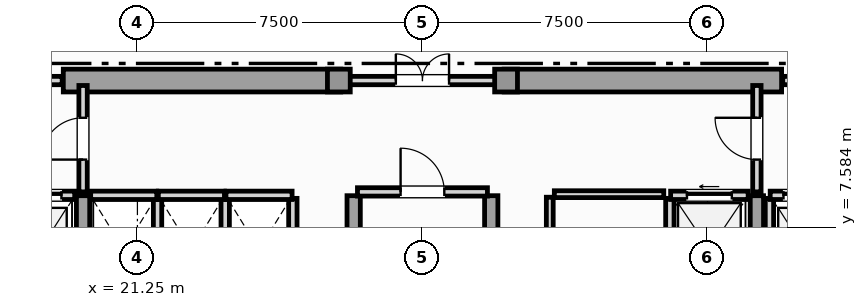
"""IFC4 building model, lengths in metres.
Left out: names, types, materials, properties, quantities, classifications, styles, units other than length and angle.
Written with IfcOpenShell. Run it as: python <this file> out.ifc"""

import sys

from ifc_helpers import new_model, si_unit, direction, frame, frame_2d, origin, origin_2d, place, context, subcontext, project, spatial, rectangle, extrude, element, fill, save


model = new_model("IFC4")
c1 = context("Model", 3, precision=1e-05, world=origin(), true_north=direction((0.0, 1.0)))
c2 = subcontext(c1, "Body", "Model", "MODEL_VIEW")
j1 = project(units=[si_unit("LENGTHUNIT", "METRE"), si_unit("PLANEANGLEUNIT", "RADIAN")], contexts=[c1])
p1 = place(None, origin())
s1 = spatial("IfcSite", under=j1, at=p1, CompositionType="ELEMENT")
p2 = place(p1, origin())
s2 = spatial("IfcBuilding", under=s1, at=p2, CompositionType="ELEMENT")
p3 = place(p2, frame((0.0, 0.0, 204.15)))
s3 = spatial("IfcBuildingStorey", under=s2, at=p3, CompositionType="ELEMENT", Elevation=204.15)
for number, where, z_axis, x_axis in (
    (1, (19.3, 11.45, 0.0), (0.0, 0.0, 1.0), (1.0, 0.0, 0.0)),
    (2, (30.9, 11.45, 0.0), (0.0, 0.0, 1.0), (1.0, 0.0, 0.0)),
):
    element("IfcWall", number, at=place(p3, frame(where, z_axis=z_axis, x_axis=x_axis)), inside=s3, PredefinedType="SHEAR", context=c2, shape_type="SweptSolid", body=[
        extrude(rectangle(XDim=7.3, YDim=0.6, at=frame_2d((3.65, 0.0))), origin(), (0.0, 0.0, 1.0), 3.63),
    ])
for number, where, z_axis, x_axis in (
    (3, (19.82, 0.92, 0.0), (0.0, 0.0, 1.0), (0.0, 1.0, 0.0)),
    (4, (26.94, 0.92, 0.0), (0.0, 0.0, 1.0), (0.0, 1.0, 0.0)),
    (5, (30.56, 0.92, 0.0), (0.0, 0.0, 1.0), (0.0, 1.0, 0.0)),
    (6, (37.55, 0.92, 0.0), (0.0, 0.0, 1.0), (0.0, 1.0, 0.0)),
):
    element("IfcWall", number, at=place(p3, frame(where, z_axis=z_axis, x_axis=x_axis)), inside=s3, PredefinedType="SHEAR", context=c2, shape_type="SweptSolid", body=[
        extrude(rectangle(XDim=7.5, YDim=0.35, at=frame_2d((3.75, 0.0))), origin(), (0.0, 0.0, 1.0), 3.63),
    ])
for number, where, z_axis, x_axis in (
    (7, (26.55, 11.45, 0.0), (0.0, 0.0, 1.0), (1.0, 0.0, 0.0)),
    (8, (30.95, 11.45, 0.0), (0.0, 0.0, 1.0), (1.0, 0.0, 0.0)),
):
    element("IfcColumn", number, at=place(p3, frame(where, z_axis=z_axis, x_axis=x_axis)), inside=s3, PredefinedType="COLUMN", context=c2, shape_type="SweptSolid", body=[
        extrude(rectangle(XDim=0.6, YDim=0.6, at=origin_2d()), origin(), (0.0, 0.0, 1.0), 3.85),
    ])
p4 = place(p3, frame((17.78, 8.43, 0.0), z_axis=(0.0, 0.0, 1.0), x_axis=(1.0, 0.0, 0.0)))
e9 = element("IfcWall", 9, at=p4, inside=s3, PredefinedType="SOLIDWALL", context=c2, shape_type="SweptSolid", body=[
    extrude(rectangle(XDim=1.82, YDim=0.22, at=frame_2d((0.91, 0.0))), origin(), (0.0, 0.0, 1.0), 3.63),
])
p5 = place(p4, frame((0.35, 0.0, 0.0)))
e10 = element("IfcOpeningElement", 10, at=p5, cuts=e9, PredefinedType="OPENING", context=c2, shape_type="SweptSolid", body=[
    extrude(rectangle(XDim=1.12, YDim=2.25, at=frame_2d((0.56, 1.125))), frame((0.0, 0.12, 0.0), z_axis=(0.0, -1.0, 0.0), x_axis=(1.0, 0.0, 0.0)), (0.0, 0.0, 1.0), 0.24),
])
p6 = place(p3, frame((37.88, 5.65, 0.0), z_axis=(0.0, 0.0, 1.0), x_axis=(0.0, 1.0, 0.0)))
e11 = element("IfcWall", 11, at=p6, inside=s3, PredefinedType="SOLIDWALL", context=c2, shape_type="SweptSolid", body=[
    extrude(rectangle(XDim=2.7, YDim=0.22, at=frame_2d((1.35, 0.0))), origin(), (0.0, 0.0, 1.0), 3.63),
])
p7 = place(p3, frame((37.9, 8.43, 0.0), z_axis=(0.0, 0.0, 1.0), x_axis=(1.0, 0.0, 0.0)))
e12 = element("IfcWall", 12, at=p7, inside=s3, PredefinedType="SOLIDWALL", context=c2, shape_type="SweptSolid", body=[
    extrude(rectangle(XDim=1.82, YDim=0.22, at=frame_2d((0.91, 0.0))), origin(), (0.0, 0.0, 1.0), 3.63),
])
p8 = place(p7, frame((0.35, 0.0, 0.0)))
e13 = element("IfcOpeningElement", 13, at=p8, cuts=e12, PredefinedType="OPENING", context=c2, shape_type="SweptSolid", body=[
    extrude(rectangle(XDim=1.12, YDim=2.25, at=frame_2d((0.56, 1.125))), frame((0.0, 0.12, 0.0), z_axis=(0.0, -1.0, 0.0), x_axis=(1.0, 0.0, 0.0)), (0.0, 0.0, 1.0), 0.24),
])
p9 = place(p3, frame((35.26, 5.65, 0.0), z_axis=(0.0, 0.0, 1.0), x_axis=(0.0, 1.0, 0.0)))
e14 = element("IfcWall", 14, at=p9, inside=s3, PredefinedType="SOLIDWALL", context=c2, shape_type="SweptSolid", body=[
    extrude(rectangle(XDim=2.7, YDim=0.22, at=frame_2d((1.35, 0.0))), origin(), (0.0, 0.0, 1.0), 3.63),
])
p10 = place(p3, frame((35.28, 8.43, 0.0), z_axis=(0.0, 0.0, 1.0), x_axis=(1.0, 0.0, 0.0)))
e15 = element("IfcWall", 15, at=p10, inside=s3, PredefinedType="SOLIDWALL", context=c2, shape_type="SweptSolid", body=[
    extrude(rectangle(XDim=2.04, YDim=0.22, at=frame_2d((1.02, 0.0))), origin(), (0.0, 0.0, 1.0), 3.63),
])
p11 = place(p10, frame((0.43, 0.0, 0.0)))
e16 = element("IfcOpeningElement", 16, at=p11, cuts=e15, PredefinedType="OPENING", context=c2, shape_type="SweptSolid", body=[
    extrude(rectangle(XDim=1.18, YDim=2.2, at=frame_2d((0.59, 1.1))), frame((0.0, 0.12, 0.0), z_axis=(0.0, -1.0, 0.0), x_axis=(1.0, 0.0, 0.0)), (0.0, 0.0, 1.0), 0.24),
])
p12 = place(p3, frame((21.78, 5.65, 0.0), z_axis=(0.0, 0.0, 1.0), x_axis=(0.0, 1.0, 0.0)))
e17 = element("IfcWall", 17, at=p12, inside=s3, PredefinedType="SOLIDWALL", context=c2, shape_type="SweptSolid", body=[
    extrude(rectangle(XDim=2.7, YDim=0.22, at=frame_2d((1.35, 0.0))), origin(), (0.0, 0.0, 1.0), 3.63),
])
p13 = place(p3, frame((20.02, 8.43, 0.0), z_axis=(0.0, 0.0, 1.0), x_axis=(1.0, 0.0, 0.0)))
e18 = element("IfcWall", 18, at=p13, inside=s3, PredefinedType="SOLIDWALL", context=c2, shape_type="SweptSolid", body=[
    extrude(rectangle(XDim=1.74, YDim=0.22, at=frame_2d((0.87, 0.0))), origin(), (0.0, 0.0, 1.0), 3.63),
])
p14 = place(p3, frame((23.56, 5.65, 0.0), z_axis=(0.0, 0.0, 1.0), x_axis=(0.0, 1.0, 0.0)))
e19 = element("IfcWall", 19, at=p14, inside=s3, PredefinedType="SOLIDWALL", context=c2, shape_type="SweptSolid", body=[
    extrude(rectangle(XDim=2.7, YDim=0.22, at=frame_2d((1.35, 0.0))), origin(), (0.0, 0.0, 1.0), 3.63),
])
p15 = place(p3, frame((21.8, 8.43, 0.0), z_axis=(0.0, 0.0, 1.0), x_axis=(1.0, 0.0, 0.0)))
e20 = element("IfcWall", 20, at=p15, inside=s3, PredefinedType="SOLIDWALL", context=c2, shape_type="SweptSolid", body=[
    extrude(rectangle(XDim=1.74, YDim=0.22, at=frame_2d((0.87, 0.0))), origin(), (0.0, 0.0, 1.0), 3.63),
])
p16 = place(p3, frame((25.34, 5.65, 0.0), z_axis=(0.0, 0.0, 1.0), x_axis=(0.0, 1.0, 0.0)))
e21 = element("IfcWall", 21, at=p16, inside=s3, PredefinedType="SOLIDWALL", context=c2, shape_type="SweptSolid", body=[
    extrude(rectangle(XDim=2.7, YDim=0.22, at=frame_2d((1.35, 0.0))), origin(), (0.0, 0.0, 1.0), 3.63),
])
p17 = place(p3, frame((23.58, 8.43, 0.0), z_axis=(0.0, 0.0, 1.0), x_axis=(1.0, 0.0, 0.0)))
e22 = element("IfcWall", 22, at=p17, inside=s3, PredefinedType="SOLIDWALL", context=c2, shape_type="SweptSolid", body=[
    extrude(rectangle(XDim=1.74, YDim=0.22, at=frame_2d((0.87, 0.0))), origin(), (0.0, 0.0, 1.0), 3.63),
])
p18 = place(p3, frame((27.04, 8.52, 0.0), z_axis=(0.0, 0.0, 1.0), x_axis=(1.0, 0.0, 0.0)))
e23 = element("IfcWall", 23, at=p18, inside=s3, PredefinedType="SOLIDWALL", context=c2, shape_type="SweptSolid", body=[
    extrude(rectangle(XDim=3.42, YDim=0.22, at=frame_2d((1.71, 0.0))), origin(), (0.0, 0.0, 1.0), 3.63),
])
p19 = place(p18, frame((1.135, 0.0, 0.0)))
e24 = element("IfcOpeningElement", 24, at=p19, cuts=e23, PredefinedType="OPENING", context=c2, shape_type="SweptSolid", body=[
    extrude(rectangle(XDim=1.15, YDim=2.2, at=frame_2d((0.575, 1.1))), frame((0.0, 0.12, 0.0), z_axis=(0.0, -1.0, 0.0), x_axis=(1.0, 0.0, 0.0)), (0.0, 0.0, 1.0), 0.24),
])
p20 = place(p3, frame((19.82, 8.52, 0.0), z_axis=(0.0, 0.0, 1.0), x_axis=(0.0, 1.0, 0.0)))
e25 = element("IfcWall", 25, at=p20, inside=s3, PredefinedType="SOLIDWALL", context=c2, shape_type="SweptSolid", body=[
    extrude(rectangle(XDim=2.8, YDim=0.22, at=frame_2d((1.4, 0.0))), origin(), (0.0, 0.0, 1.0), 3.086),
])
p21 = place(p20, frame((0.85, 0.0, 0.0)))
e26 = element("IfcOpeningElement", 26, at=p21, cuts=e25, PredefinedType="OPENING", context=c2, shape_type="SweptSolid", body=[
    extrude(rectangle(XDim=1.1, YDim=2.2, at=frame_2d((0.55, 1.1))), frame((0.0, 0.12, 0.0), z_axis=(0.0, -1.0, 0.0), x_axis=(1.0, 0.0, 0.0)), (0.0, 0.0, 1.0), 0.24),
])
p22 = place(p3, frame((37.55, 8.52, 0.0), z_axis=(0.0, 0.0, 1.0), x_axis=(0.0, 1.0, 0.0)))
e27 = element("IfcWall", 27, at=p22, inside=s3, PredefinedType="SOLIDWALL", context=c2, shape_type="SweptSolid", body=[
    extrude(rectangle(XDim=2.8, YDim=0.22, at=frame_2d((1.4, 0.0))), origin(), (0.0, 0.0, 1.0), 3.086),
])
p23 = place(p22, frame((0.85, 0.0, 0.0)))
e28 = element("IfcOpeningElement", 28, at=p23, cuts=e27, PredefinedType="OPENING", context=c2, shape_type="SweptSolid", body=[
    extrude(rectangle(XDim=1.1, YDim=2.2, at=frame_2d((0.55, 1.1))), frame((0.0, 0.12, 0.0), z_axis=(0.0, -1.0, 0.0), x_axis=(1.0, 0.0, 0.0)), (0.0, 0.0, 1.0), 0.24),
])
p24 = place(p3, frame((16.23, 11.45, 0.0), z_axis=(0.0, 0.0, 1.0), x_axis=(1.0, 0.0, 0.0)))
e29 = element("IfcWall", 29, at=p24, inside=s3, PredefinedType="SOLIDWALL", context=c2, shape_type="SweptSolid", body=[
    extrude(rectangle(XDim=3.04, YDim=0.22, at=frame_2d((1.52, 0.0))), origin(), (0.0, 0.0, 1.0), 3.63),
])
p25 = place(p24, frame((0.97, 0.0, 0.0)))
e30 = element("IfcOpeningElement", 30, at=p25, cuts=e29, PredefinedType="OPENING", context=c2, shape_type="SweptSolid", body=[
    extrude(rectangle(XDim=1.1, YDim=2.2, at=frame_2d((0.55, 1.1))), frame((0.0, 0.12, 0.0), z_axis=(0.0, -1.0, 0.0), x_axis=(1.0, 0.0, 0.0)), (0.0, 0.0, 1.0), 0.24),
])
p26 = place(p3, frame((26.63, 11.45, 0.0), z_axis=(0.0, 0.0, 1.0), x_axis=(1.0, 0.0, 0.0)))
e31 = element("IfcWall", 31, at=p26, inside=s3, PredefinedType="SOLIDWALL", context=c2, shape_type="SweptSolid", body=[
    extrude(rectangle(XDim=4.24, YDim=0.22, at=frame_2d((2.12, 0.0))), origin(), (0.0, 0.0, 1.0), 3.63),
])
p27 = place(p26, frame((1.42, 0.0, 0.0)))
e32 = element("IfcOpeningElement", 32, at=p27, cuts=e31, PredefinedType="OPENING", context=c2, shape_type="SweptSolid", body=[
    extrude(rectangle(XDim=1.4, YDim=2.2, at=frame_2d((0.7, 1.1))), frame((0.0, 0.12, 0.0), z_axis=(0.0, -1.0, 0.0), x_axis=(1.0, 0.0, 0.0)), (0.0, 0.0, 1.0), 0.24),
])
p28 = place(p3, frame((38.23, 11.45, 0.0), z_axis=(0.0, 0.0, 1.0), x_axis=(1.0, 0.0, 0.0)))
e33 = element("IfcWall", 33, at=p28, inside=s3, PredefinedType="SOLIDWALL", context=c2, shape_type="SweptSolid", body=[
    extrude(rectangle(XDim=3.04, YDim=0.22, at=frame_2d((1.52, 0.0))), origin(), (0.0, 0.0, 1.0), 3.63),
])
p29 = place(p28, frame((0.97, 0.0, 0.0)))
e34 = element("IfcOpeningElement", 34, at=p29, cuts=e33, PredefinedType="OPENING", context=c2, shape_type="SweptSolid", body=[
    extrude(rectangle(XDim=1.1, YDim=2.2, at=frame_2d((0.55, 1.1))), frame((0.0, 0.12, 0.0), z_axis=(0.0, -1.0, 0.0), x_axis=(1.0, 0.0, 0.0)), (0.0, 0.0, 1.0), 0.24),
])
p30 = place(p3, frame((32.1, 5.65, 0.0), z_axis=(0.0, 0.0, 1.0), x_axis=(0.0, 1.0, 0.0)))
e35 = element("IfcWall", 35, at=p30, inside=s3, PredefinedType="PARTITIONING", context=c2, shape_type="SweptSolid", body=[
    extrude(rectangle(XDim=2.73, YDim=0.18, at=frame_2d((1.365, 0.0))), origin(), (0.0, 0.0, 1.0), 3.63),
])
p31 = place(p30, frame((0.925, 0.0, 0.0)))
e36 = element("IfcOpeningElement", 36, at=p31, cuts=e35, PredefinedType="OPENING", context=c2, shape_type="SweptSolid", body=[
    extrude(rectangle(XDim=0.88, YDim=2.05, at=frame_2d((0.44, 1.025))), frame((0.0, 0.1, 0.0), z_axis=(0.0, -1.0, 0.0), x_axis=(1.0, 0.0, 0.0)), (0.0, 0.0, 1.0), 0.2),
])
p32 = place(p3, frame((32.22, 8.46, 0.0), z_axis=(0.0, 0.0, 1.0), x_axis=(1.0, 0.0, 0.0)))
e37 = element("IfcWall", 37, at=p32, inside=s3, PredefinedType="PARTITIONING", context=c2, shape_type="SweptSolid", body=[
    extrude(rectangle(XDim=2.88, YDim=0.18, at=frame_2d((1.44, 0.0))), origin(), (0.0, 0.0, 1.0), 3.63),
])
p33 = place(p5, origin())
e38 = element("IfcDoor", 38, at=p33, inside=s3, OperationType="SLIDING_TO_LEFT", PredefinedType="DOOR", context=c2, shape_type="SweptSolid", body=[
    extrude(rectangle(XDim=1.12, YDim=2.25, at=frame_2d((0.56, 1.125))), frame((0.0, 0.025, 0.0), z_axis=(0.0, -1.0, 0.0), x_axis=(1.0, 0.0, 0.0)), (0.0, 0.0, 1.0), 0.05),
])
fill(e10, e38)
p34 = place(p8, origin())
e39 = element("IfcDoor", 39, at=p34, inside=s3, OperationType="SLIDING_TO_RIGHT", PredefinedType="DOOR", context=c2, shape_type="SweptSolid", body=[
    extrude(rectangle(XDim=1.12, YDim=2.25, at=frame_2d((0.56, 1.125))), frame((0.0, 0.025, 0.0), z_axis=(0.0, -1.0, 0.0), x_axis=(1.0, 0.0, 0.0)), (0.0, 0.0, 1.0), 0.05),
])
fill(e13, e39)
p35 = place(p11, origin())
e40 = element("IfcDoor", 40, at=p35, inside=s3, OperationType="SLIDING_TO_LEFT", PredefinedType="DOOR", context=c2, shape_type="SweptSolid", body=[
    extrude(rectangle(XDim=1.18, YDim=2.2, at=frame_2d((0.59, 1.1))), frame((0.0, 0.025, 0.0), z_axis=(0.0, -1.0, 0.0), x_axis=(1.0, 0.0, 0.0)), (0.0, 0.0, 1.0), 0.05),
])
fill(e16, e40)
p36 = place(p19, origin())
e41 = element("IfcDoor", 41, at=p36, inside=s3, OperationType="SINGLE_SWING_LEFT", PredefinedType="DOOR", context=c2, shape_type="SweptSolid", body=[
    extrude(rectangle(XDim=1.15, YDim=2.2, at=frame_2d((0.575, 1.1))), frame((0.0, 0.025, 0.0), z_axis=(0.0, -1.0, 0.0), x_axis=(1.0, 0.0, 0.0)), (0.0, 0.0, 1.0), 0.05),
])
fill(e24, e41)
p37 = place(p21, origin())
e42 = element("IfcDoor", 42, at=p37, inside=s3, OperationType="SINGLE_SWING_LEFT", PredefinedType="DOOR", context=c2, shape_type="SweptSolid", body=[
    extrude(rectangle(XDim=1.1, YDim=2.2, at=frame_2d((0.55, 1.1))), frame((0.0, 0.025, 0.0), z_axis=(0.0, -1.0, 0.0), x_axis=(1.0, 0.0, 0.0)), (0.0, 0.0, 1.0), 0.05),
])
fill(e26, e42)
p38 = place(p23, origin())
e43 = element("IfcDoor", 43, at=p38, inside=s3, OperationType="SINGLE_SWING_RIGHT", PredefinedType="DOOR", context=c2, shape_type="SweptSolid", body=[
    extrude(rectangle(XDim=1.1, YDim=2.2, at=frame_2d((0.55, 1.1))), frame((0.0, 0.025, 0.0), z_axis=(0.0, -1.0, 0.0), x_axis=(1.0, 0.0, 0.0)), (0.0, 0.0, 1.0), 0.05),
])
fill(e28, e43)
p39 = place(p27, origin())
e44 = element("IfcDoor", 44, at=p39, inside=s3, OperationType="DOUBLE_DOOR_SINGLE_SWING", PredefinedType="DOOR", context=c2, shape_type="SweptSolid", body=[
    extrude(rectangle(XDim=1.4, YDim=2.2, at=frame_2d((0.7, 1.1))), frame((0.0, 0.025, 0.0), z_axis=(0.0, -1.0, 0.0), x_axis=(1.0, 0.0, 0.0)), (0.0, 0.0, 1.0), 0.05),
])
fill(e32, e44)
save(model, sys.argv[1])
